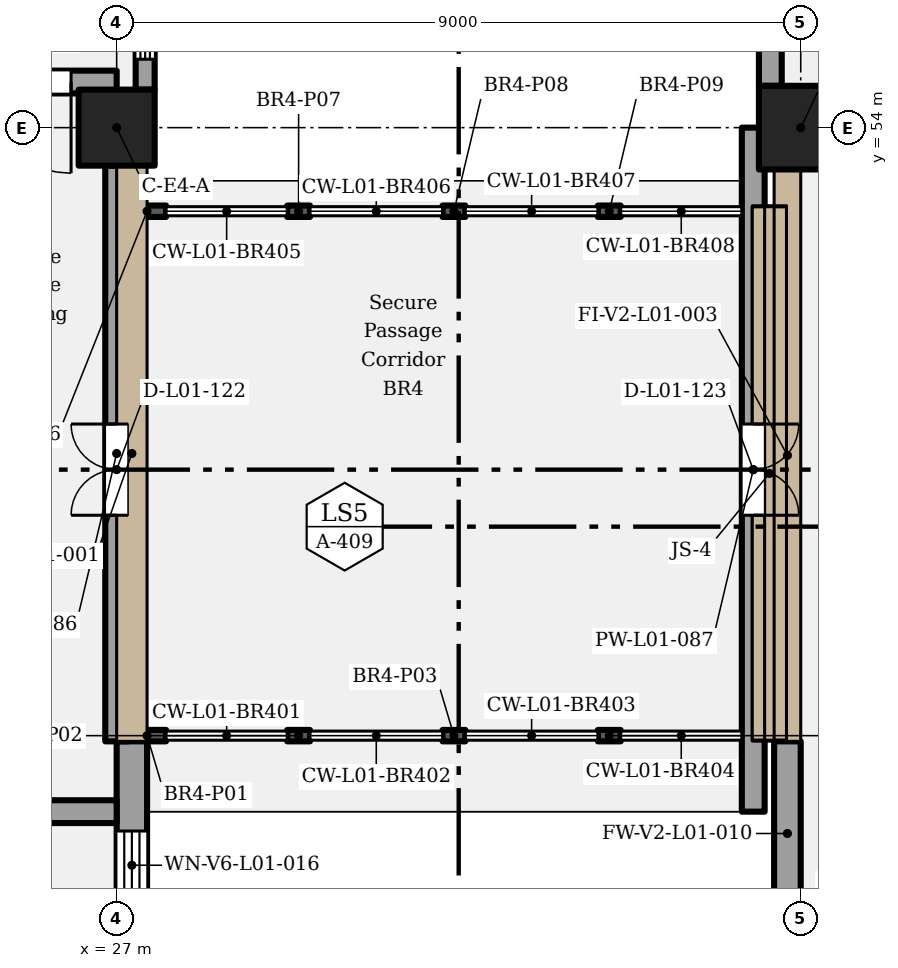
"""IFC4 building model, lengths in metres.
Left out: names, types, materials, properties, quantities, classifications, styles, units other than length and angle.
Written with IfcOpenShell. Run it as: python <this file> out.ifc"""

import sys

from ifc_helpers import new_model, si_unit, direction, frame, frame_2d, origin, origin_2d, place, context, subcontext, project, spatial, rectangle, extrude, element, fill, save


model = new_model("IFC4")
c1 = context("Model", 3, precision=1e-05, world=origin(), true_north=direction((0.0, 1.0)))
c2 = subcontext(c1, "Body", "Model", "MODEL_VIEW")
j1 = project(units=[si_unit("LENGTHUNIT", "METRE"), si_unit("PLANEANGLEUNIT", "RADIAN")], contexts=[c1])
p1 = place(None, origin())
s1 = spatial("IfcSite", under=j1, at=p1, CompositionType="ELEMENT")
p2 = place(p1, origin())
s2 = spatial("IfcBuilding", under=s1, at=p2, CompositionType="ELEMENT")
p3 = place(p2, frame((0.0, 0.0, 6.6)))
s3 = spatial("IfcBuildingStorey", under=s2, at=p3, CompositionType="ELEMENT", Elevation=6.6)
p4 = place(p3, frame((27.0, 54.0, 0.0), z_axis=(0.0, 0.0, 1.0), x_axis=(1.0, 0.0, 0.0)))
e1 = element("IfcColumn", 1, at=p4, inside=s3, PredefinedType="COLUMN", context=c2, shape_type="SweptSolid", body=[
    extrude(rectangle(XDim=1.0, YDim=1.0, at=origin_2d()), origin(), (0.0, 0.0, 1.0), 5.4),
])
p5 = place(p3, frame((36.0, 54.0, 0.0), z_axis=(0.0, 0.0, 1.0), x_axis=(1.0, 0.0, 0.0)))
e2 = element("IfcColumn", 2, at=p5, inside=s3, PredefinedType="COLUMN", context=c2, shape_type="SweptSolid", body=[
    extrude(rectangle(XDim=1.1, YDim=1.1, at=origin_2d()), origin(), (0.0, 0.0, 1.0), 5.4),
])
p6 = place(p3, frame((35.825, 43.5, 0.0), z_axis=(0.0, 0.0, 1.0), x_axis=(0.0, 1.0, 0.0)))
e3 = element("IfcWall", 3, at=p6, inside=s3, PredefinedType="SOLIDWALL", context=c2, shape_type="SweptSolid", body=[
    extrude(rectangle(XDim=2.425, YDim=0.35, at=frame_2d((1.212, 0.0))), origin(), (0.0, 0.0, 1.0), 5.1),
])
p7 = place(p3, frame((35.6, 54.55, 0.0), z_axis=(0.0, 0.0, 1.0), x_axis=(0.0, 1.0, 0.0)))
e4 = element("IfcWall", 4, at=p7, inside=s3, PredefinedType="SOLIDWALL", context=c2, shape_type="SweptSolid", body=[
    extrude(rectangle(XDim=2.45, YDim=0.3, at=frame_2d((1.225, 0.0))), origin(), (0.0, 0.0, 1.0), 5.1),
])
p8 = place(p7, frame((0.7, 0.0, 1.05)))
e5 = element("IfcOpeningElement", 5, at=p8, cuts=e4, PredefinedType="OPENING", context=c2, shape_type="SweptSolid", body=[
    extrude(rectangle(XDim=1.5, YDim=3.45, at=frame_2d((0.75, 1.725))), frame((0.0, 0.16, 0.0), z_axis=(0.0, -1.0, 0.0), x_axis=(1.0, 0.0, 0.0)), (0.0, 0.0, 1.0), 0.32),
])
p9 = place(p3, frame((27.2, 38.0, 0.0), z_axis=(0.0, 0.0, 1.0), x_axis=(0.0, 1.0, 0.0)))
e6 = element("IfcWall", 6, at=p9, inside=s3, PredefinedType="SOLIDWALL", context=c2, shape_type="SweptSolid", body=[
    extrude(rectangle(XDim=7.925, YDim=0.4, at=frame_2d((3.962, 0.0))), origin(), (0.0, 0.0, 1.0), 5.1),
])
p10 = place(p9, frame((0.425, 0.0, 1.5)))
e7 = element("IfcOpeningElement", 7, at=p10, cuts=e6, PredefinedType="OPENING", context=c2, shape_type="SweptSolid", body=[
    extrude(rectangle(XDim=0.9, YDim=1.8, at=frame_2d((0.45, 0.9))), frame((0.0, 0.21, 0.0), z_axis=(0.0, -1.0, 0.0), x_axis=(1.0, 0.0, 0.0)), (0.0, 0.0, 1.0), 0.42),
])
p11 = place(p9, frame((3.175, 0.0, 1.5)))
e8 = element("IfcOpeningElement", 8, at=p11, cuts=e6, PredefinedType="OPENING", context=c2, shape_type="SweptSolid", body=[
    extrude(rectangle(XDim=0.9, YDim=1.8, at=frame_2d((0.45, 0.9))), frame((0.0, 0.21, 0.0), z_axis=(0.0, -1.0, 0.0), x_axis=(1.0, 0.0, 0.0)), (0.0, 0.0, 1.0), 0.42),
])
p12 = place(p9, frame((5.845, 0.0, 1.5)))
e9 = element("IfcOpeningElement", 9, at=p12, cuts=e6, PredefinedType="OPENING", context=c2, shape_type="SweptSolid", body=[
    extrude(rectangle(XDim=0.9, YDim=1.8, at=frame_2d((0.45, 0.9))), frame((0.0, 0.21, 0.0), z_axis=(0.0, -1.0, 0.0), x_axis=(1.0, 0.0, 0.0)), (0.0, 0.0, 1.0), 0.42),
])
p13 = place(p3, frame((27.375, 54.5, 0.0), z_axis=(0.0, 0.0, 1.0), x_axis=(0.0, 1.0, 0.0)))
e10 = element("IfcWall", 10, at=p13, inside=s3, PredefinedType="SOLIDWALL", context=c2, shape_type="SweptSolid", body=[
    extrude(rectangle(XDim=11.05, YDim=0.25, at=frame_2d((5.525, 0.0))), origin(), (0.0, 0.0, 1.0), 5.1),
])
p14 = place(p13, frame((0.4, 0.0, 0.9)))
e11 = element("IfcOpeningElement", 11, at=p14, cuts=e10, PredefinedType="OPENING", context=c2, shape_type="SweptSolid", body=[
    extrude(rectangle(XDim=1.2, YDim=2.4, at=frame_2d((0.6, 1.2))), frame((0.0, 0.135, 0.0), z_axis=(0.0, -1.0, 0.0), x_axis=(1.0, 0.0, 0.0)), (0.0, 0.0, 1.0), 0.27),
])
p15 = place(p3, frame((18.15, 45.0, 0.0), z_axis=(0.0, 0.0, 1.0), x_axis=(1.0, 0.0, 0.0)))
e12 = element("IfcWall", 12, at=p15, inside=s3, PredefinedType="PARTITIONING", context=c2, shape_type="SweptSolid", body=[
    extrude(rectangle(XDim=8.85, YDim=0.3, at=frame_2d((4.425, 0.0))), origin(), (0.0, 0.0, 1.0), 5.1),
])
p16 = place(p15, frame((3.35, 0.0, 0.0), z_axis=(0.0, 0.0, 1.0), x_axis=(-1.0, 0.0, 0.0)))
e13 = element("IfcOpeningElement", 13, at=p16, cuts=e12, PredefinedType="OPENING", context=c2, shape_type="SweptSolid", body=[
    extrude(rectangle(XDim=1.0, YDim=2.1, at=frame_2d((0.5, 1.05))), frame((0.0, 0.16, 0.0), z_axis=(0.0, -1.0, 0.0), x_axis=(1.0, 0.0, 0.0)), (0.0, 0.0, 1.0), 0.32),
])
p17 = place(p3, frame((11.25, 54.6, 0.0), z_axis=(0.0, 0.0, 1.0), x_axis=(1.0, 0.0, 0.0)))
e14 = element("IfcWall", 14, at=p17, inside=s3, PredefinedType="PARTITIONING", context=c2, shape_type="SweptSolid", body=[
    extrude(rectangle(XDim=15.75, YDim=0.3, at=frame_2d((7.875, 0.0))), origin(), (0.0, 0.0, 1.0), 5.1),
])
p18 = place(p17, frame((15.15, 0.0, 0.0), z_axis=(0.0, 0.0, 1.0), x_axis=(-1.0, 0.0, 0.0)))
e15 = element("IfcOpeningElement", 15, at=p18, cuts=e14, PredefinedType="OPENING", context=c2, shape_type="SweptSolid", body=[
    extrude(rectangle(XDim=1.2, YDim=2.1, at=frame_2d((0.6, 1.05))), frame((0.0, 0.16, 0.0), z_axis=(0.0, -1.0, 0.0), x_axis=(1.0, 0.0, 0.0)), (0.0, 0.0, 1.0), 0.32),
])
p19 = place(p17, frame((10.25, 0.0, 0.0), z_axis=(0.0, 0.0, 1.0), x_axis=(-1.0, 0.0, 0.0)))
e16 = element("IfcOpeningElement", 16, at=p19, cuts=e14, PredefinedType="OPENING", context=c2, shape_type="SweptSolid", body=[
    extrude(rectangle(XDim=1.0, YDim=2.1, at=frame_2d((0.5, 1.05))), frame((0.0, 0.16, 0.0), z_axis=(0.0, -1.0, 0.0), x_axis=(1.0, 0.0, 0.0)), (0.0, 0.0, 1.0), 0.32),
])
p20 = place(p3, frame((27.0, 45.925, 0.0), z_axis=(0.0, 0.0, 1.0), x_axis=(0.0, 1.0, 0.0)))
e17 = element("IfcWall", 17, at=p20, inside=s3, PredefinedType="PARTITIONING", context=c2, shape_type="SweptSolid", body=[
    extrude(rectangle(XDim=7.575, YDim=0.3, at=frame_2d((3.788, 0.0))), origin(), (0.0, 0.0, 1.0), 3.3),
])
p21 = place(p20, frame((2.975, 0.0, 0.0)))
e18 = element("IfcOpeningElement", 18, at=p21, cuts=e17, PredefinedType="OPENING", context=c2, shape_type="SweptSolid", body=[
    extrude(rectangle(XDim=1.2, YDim=2.4, at=frame_2d((0.6, 1.2))), frame((0.0, 0.16, 0.0), z_axis=(0.0, -1.0, 0.0), x_axis=(1.0, 0.0, 0.0)), (0.0, 0.0, 1.0), 0.32),
])
p22 = place(p3, frame((35.375, 45.0, 0.0), z_axis=(0.0, 0.0, 1.0), x_axis=(0.0, 1.0, 0.0)))
e19 = element("IfcWall", 19, at=p22, inside=s3, PredefinedType="PARTITIONING", context=c2, shape_type="SweptSolid", body=[
    extrude(rectangle(XDim=9.0, YDim=0.3, at=frame_2d((4.5, 0.0))), origin(), (0.0, 0.0, 1.0), 3.3),
])
p23 = place(p22, frame((5.1, 0.0, 0.0), z_axis=(0.0, 0.0, 1.0), x_axis=(-1.0, 0.0, 0.0)))
e20 = element("IfcOpeningElement", 20, at=p23, cuts=e19, PredefinedType="OPENING", context=c2, shape_type="SweptSolid", body=[
    extrude(rectangle(XDim=1.2, YDim=2.4, at=frame_2d((0.6, 1.2))), frame((0.0, 0.16, 0.0), z_axis=(0.0, -1.0, 0.0), x_axis=(1.0, 0.0, 0.0)), (0.0, 0.0, 1.0), 0.32),
])
p24 = place(p3, frame((27.15, 46.0, 0.0), z_axis=(0.0, 0.0, 1.0), x_axis=(1.0, 0.0, 0.0)))
e21 = element("IfcWall", 21, at=p24, inside=s3, PredefinedType="SOLIDWALL", context=c2, shape_type="SweptSolid", body=[
    extrude(rectangle(XDim=0.5, YDim=0.15, at=frame_2d((0.25, 0.0))), origin(), (0.0, 0.0, 1.0), 3.3),
])
for number, where, z_axis, x_axis in (
    (22, (29.244, 46.0, 0.0), (0.0, 0.0, 1.0), (1.0, 0.0, 0.0)),
    (23, (31.288, 46.0, 0.0), (0.0, 0.0, 1.0), (1.0, 0.0, 0.0)),
):
    element("IfcWall", number, at=place(p3, frame(where, z_axis=z_axis, x_axis=x_axis)), inside=s3, PredefinedType="SOLIDWALL", context=c2, shape_type="SweptSolid", body=[
        extrude(rectangle(XDim=0.3, YDim=0.15, at=frame_2d((0.15, 0.0))), origin(), (0.0, 0.0, 1.0), 3.3),
    ])
p25 = place(p3, frame((33.331, 46.0, 0.0), z_axis=(0.0, 0.0, 1.0), x_axis=(1.0, 0.0, 0.0)))
e24 = element("IfcWall", 24, at=p25, inside=s3, PredefinedType="SOLIDWALL", context=c2, shape_type="SweptSolid", body=[
    extrude(rectangle(XDim=0.3, YDim=0.15, at=frame_2d((0.15, 0.0))), origin(), (0.0, 0.0, 1.0), 3.3),
])
p26 = place(p3, frame((27.15, 52.9, 0.0), z_axis=(0.0, 0.0, 1.0), x_axis=(1.0, 0.0, 0.0)))
e25 = element("IfcWall", 25, at=p26, inside=s3, PredefinedType="SOLIDWALL", context=c2, shape_type="SweptSolid", body=[
    extrude(rectangle(XDim=0.5, YDim=0.15, at=frame_2d((0.25, 0.0))), origin(), (0.0, 0.0, 1.0), 3.3),
])
for number, where, z_axis, x_axis in (
    (26, (29.244, 52.9, 0.0), (0.0, 0.0, 1.0), (1.0, 0.0, 0.0)),
    (27, (31.288, 52.9, 0.0), (0.0, 0.0, 1.0), (1.0, 0.0, 0.0)),
):
    element("IfcWall", number, at=place(p3, frame(where, z_axis=z_axis, x_axis=x_axis)), inside=s3, PredefinedType="SOLIDWALL", context=c2, shape_type="SweptSolid", body=[
        extrude(rectangle(XDim=0.3, YDim=0.15, at=frame_2d((0.15, 0.0))), origin(), (0.0, 0.0, 1.0), 3.3),
    ])
p27 = place(p3, frame((33.331, 52.9, 0.0), z_axis=(0.0, 0.0, 1.0), x_axis=(1.0, 0.0, 0.0)))
e28 = element("IfcWall", 28, at=p27, inside=s3, PredefinedType="SOLIDWALL", context=c2, shape_type="SweptSolid", body=[
    extrude(rectangle(XDim=0.3, YDim=0.15, at=frame_2d((0.15, 0.0))), origin(), (0.0, 0.0, 1.0), 3.3),
])
p28 = place(p12, origin())
e29 = element("IfcWindow", 29, at=p28, inside=s3, PartitioningType="SINGLE_PANEL", PredefinedType="WINDOW", context=c2, shape_type="SweptSolid", body=[
    extrude(rectangle(XDim=0.9, YDim=1.8, at=frame_2d((0.45, 0.9))), frame((0.0, 0.03, 0.0), z_axis=(0.0, -1.0, 0.0), x_axis=(1.0, 0.0, 0.0)), (0.0, 0.0, 1.0), 0.06),
])
fill(e9, e29)
p29 = place(p14, origin())
e30 = element("IfcWindow", 30, at=p29, inside=s3, PartitioningType="SINGLE_PANEL", PredefinedType="WINDOW", context=c2, shape_type="SweptSolid", body=[
    extrude(rectangle(XDim=1.2, YDim=2.4, at=frame_2d((0.6, 1.2))), frame((0.0, 0.03, 0.0), z_axis=(0.0, -1.0, 0.0), x_axis=(1.0, 0.0, 0.0)), (0.0, 0.0, 1.0), 0.06),
])
fill(e11, e30)
p30 = place(p21, origin())
e31 = element("IfcDoor", 31, at=p30, inside=s3, OperationType="DOUBLE_DOOR_SINGLE_SWING", PredefinedType="DOOR", context=c2, shape_type="SweptSolid", body=[
    extrude(rectangle(XDim=1.2, YDim=2.4, at=frame_2d((0.6, 1.2))), frame((0.0, 0.025, 0.0), z_axis=(0.0, -1.0, 0.0), x_axis=(1.0, 0.0, 0.0)), (0.0, 0.0, 1.0), 0.05),
])
fill(e18, e31)
p31 = place(p23, origin())
e32 = element("IfcDoor", 32, at=p31, inside=s3, OperationType="DOUBLE_DOOR_SINGLE_SWING", PredefinedType="DOOR", context=c2, shape_type="SweptSolid", body=[
    extrude(rectangle(XDim=1.2, YDim=2.4, at=frame_2d((0.6, 1.2))), frame((0.0, 0.025, 0.0), z_axis=(0.0, -1.0, 0.0), x_axis=(1.0, 0.0, 0.0)), (0.0, 0.0, 1.0), 0.05),
])
fill(e20, e32)
p32 = place(p18, origin())
e33 = element("IfcDoor", 33, at=p32, inside=s3, OperationType="SINGLE_SWING_LEFT", PredefinedType="DOOR", context=c2, shape_type="SweptSolid", body=[
    extrude(rectangle(XDim=1.2, YDim=2.1, at=frame_2d((0.6, 1.05))), frame((0.0, 0.025, 0.0), z_axis=(0.0, -1.0, 0.0), x_axis=(1.0, 0.0, 0.0)), (0.0, 0.0, 1.0), 0.05),
])
fill(e15, e33)
save(model, sys.argv[1])
